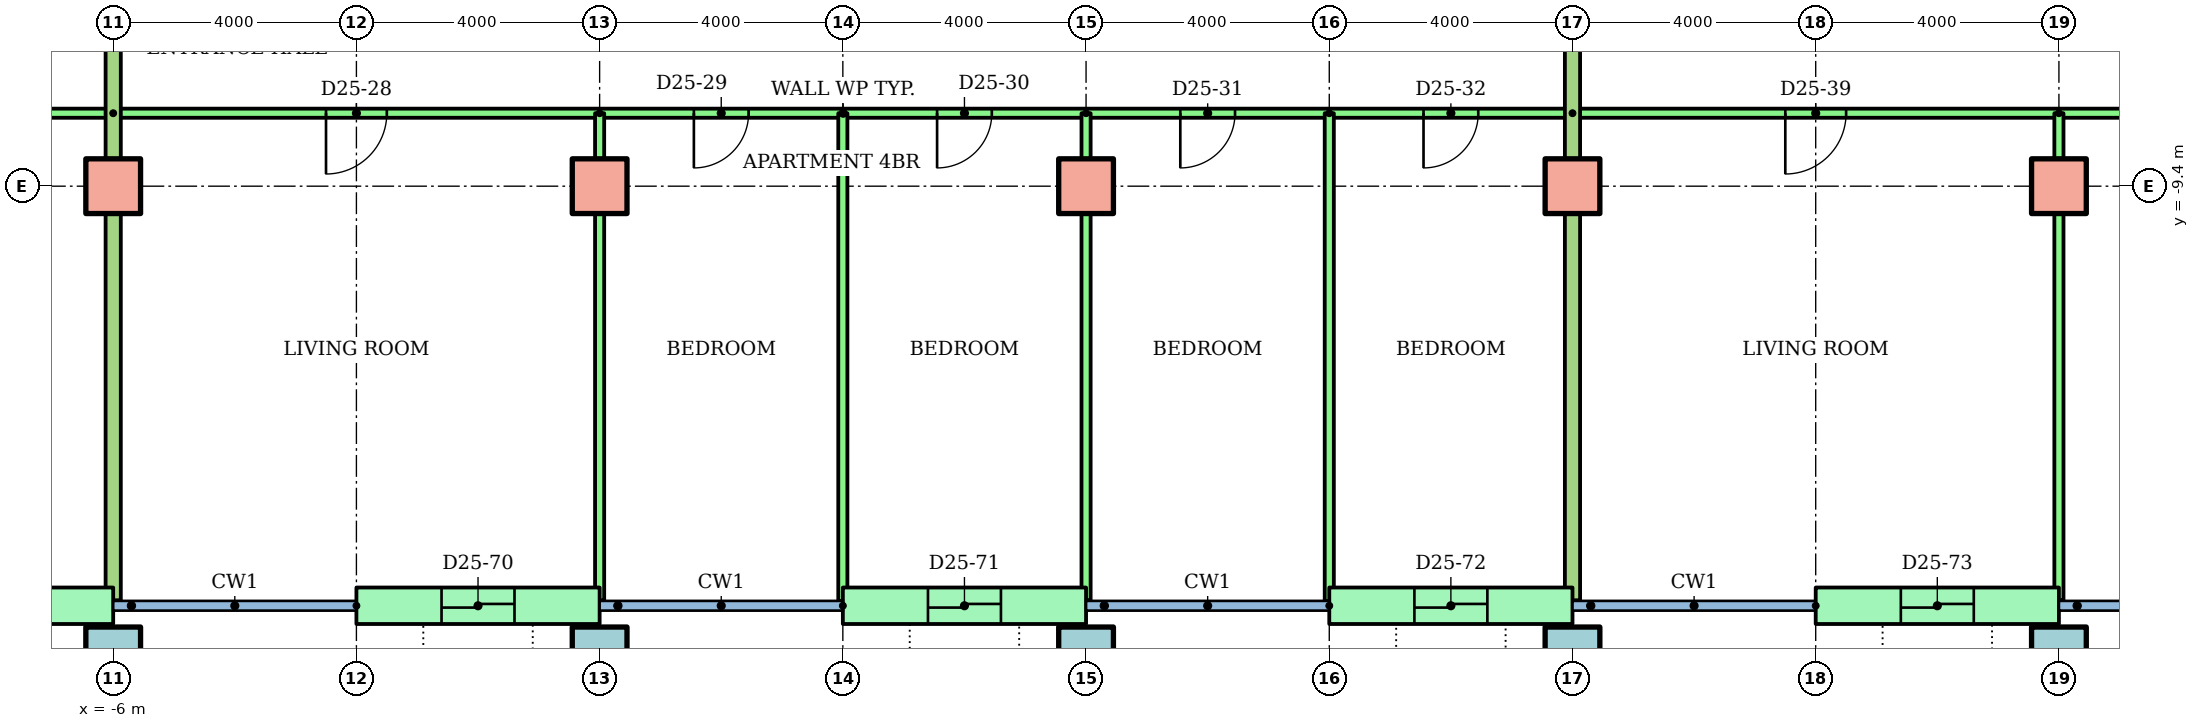
"""IFC4 building model, lengths in metres.
Left out: names, types, materials, properties, quantities, classifications, styles, units other than length and angle.
Written with IfcOpenShell. Run it as: python <this file> out.ifc"""

import sys

from ifc_helpers import new_model, si_unit, direction, frame, frame_2d, origin, origin_2d, place, context, subcontext, project, spatial, rectangle, hollow_rectangle, extrude, element, fill, save


model = new_model("IFC4")
c1 = context("Model", 3, precision=1e-05, world=origin(), true_north=direction((0.0, 1.0)))
c2 = subcontext(c1, "Body", "Model", "MODEL_VIEW")
j1 = project(units=[si_unit("LENGTHUNIT", "METRE"), si_unit("PLANEANGLEUNIT", "RADIAN")], contexts=[c1])
p1 = place(None, origin())
s1 = spatial("IfcSite", under=j1, at=p1, CompositionType="ELEMENT")
p2 = place(p1, origin())
s2 = spatial("IfcBuilding", under=s1, at=p2, CompositionType="ELEMENT")
p3 = place(p2, frame((0.0, 0.0, 96.7)))
s3 = spatial("IfcBuildingStorey", under=s2, at=p3, CompositionType="ELEMENT", Elevation=96.7)
for number, where in (
    (1, (-6.0, -17.1, 0.0)),
    (2, (2.0, -17.1, 0.0)),
    (3, (10.0, -17.1, 0.0)),
    (4, (18.0, -17.1, 0.0)),
    (5, (26.0, -17.1, 0.0)),
):
    element("IfcColumn", number, at=place(p3, frame(where)), inside=s3, PredefinedType="COLUMN", context=c2, shape_type="SweptSolid", body=[
        extrude(hollow_rectangle(XDim=0.9, YDim=0.9, WallThickness=0.045, at=origin_2d()), origin(), (0.0, 0.0, 1.0), 3.2),
    ])
for number, where in (
    (6, (-6.0, -9.4, 0.0)),
    (7, (2.0, -9.4, 0.0)),
    (8, (10.0, -9.4, 0.0)),
    (9, (18.0, -9.4, 0.0)),
    (10, (26.0, -9.4, 0.0)),
):
    element("IfcColumn", number, at=place(p3, frame(where)), inside=s3, PredefinedType="COLUMN", context=c2, shape_type="SweptSolid", body=[
        extrude(rectangle(XDim=0.9, YDim=0.9, at=origin_2d()), origin(), (0.0, 0.0, 1.0), 3.2),
    ])
p4 = place(p3, frame((-10.0, -16.3, 0.0)))
e11 = element("IfcWall", 11, at=p4, inside=s3, PredefinedType="STANDARD", context=c2, shape_type="SweptSolid", body=[
    extrude(rectangle(XDim=4.0, YDim=0.6, at=frame_2d((2.0, 0.0))), origin(), (0.0, 0.0, 1.0), 2.92),
])
p5 = place(p4, frame((1.4, 0.0, 0.0)))
e12 = element("IfcOpeningElement", 12, at=p5, cuts=e11, PredefinedType="OPENING", context=c2, shape_type="SweptSolid", body=[
    extrude(rectangle(XDim=1.2, YDim=2.1, at=frame_2d((0.6, 1.05))), frame((0.0, 0.31, 0.0), z_axis=(0.0, -1.0, 0.0), x_axis=(1.0, 0.0, 0.0)), (0.0, 0.0, 1.0), 0.62),
])
p6 = place(p3, frame((-2.0, -16.3, 0.0)))
e13 = element("IfcWall", 13, at=p6, inside=s3, PredefinedType="STANDARD", context=c2, shape_type="SweptSolid", body=[
    extrude(rectangle(XDim=4.0, YDim=0.6, at=frame_2d((2.0, 0.0))), origin(), (0.0, 0.0, 1.0), 2.92),
])
p7 = place(p6, frame((1.4, 0.0, 0.0)))
e14 = element("IfcOpeningElement", 14, at=p7, cuts=e13, PredefinedType="OPENING", context=c2, shape_type="SweptSolid", body=[
    extrude(rectangle(XDim=1.2, YDim=2.1, at=frame_2d((0.6, 1.05))), frame((0.0, 0.31, 0.0), z_axis=(0.0, -1.0, 0.0), x_axis=(1.0, 0.0, 0.0)), (0.0, 0.0, 1.0), 0.62),
])
p8 = place(p3, frame((6.0, -16.3, 0.0)))
e15 = element("IfcWall", 15, at=p8, inside=s3, PredefinedType="STANDARD", context=c2, shape_type="SweptSolid", body=[
    extrude(rectangle(XDim=4.0, YDim=0.6, at=frame_2d((2.0, 0.0))), origin(), (0.0, 0.0, 1.0), 2.92),
])
p9 = place(p8, frame((1.4, 0.0, 0.0)))
e16 = element("IfcOpeningElement", 16, at=p9, cuts=e15, PredefinedType="OPENING", context=c2, shape_type="SweptSolid", body=[
    extrude(rectangle(XDim=1.2, YDim=2.1, at=frame_2d((0.6, 1.05))), frame((0.0, 0.31, 0.0), z_axis=(0.0, -1.0, 0.0), x_axis=(1.0, 0.0, 0.0)), (0.0, 0.0, 1.0), 0.62),
])
p10 = place(p3, frame((14.0, -16.3, 0.0)))
e17 = element("IfcWall", 17, at=p10, inside=s3, PredefinedType="STANDARD", context=c2, shape_type="SweptSolid", body=[
    extrude(rectangle(XDim=4.0, YDim=0.6, at=frame_2d((2.0, 0.0))), origin(), (0.0, 0.0, 1.0), 2.92),
])
p11 = place(p10, frame((1.4, 0.0, 0.0)))
e18 = element("IfcOpeningElement", 18, at=p11, cuts=e17, PredefinedType="OPENING", context=c2, shape_type="SweptSolid", body=[
    extrude(rectangle(XDim=1.2, YDim=2.1, at=frame_2d((0.6, 1.05))), frame((0.0, 0.31, 0.0), z_axis=(0.0, -1.0, 0.0), x_axis=(1.0, 0.0, 0.0)), (0.0, 0.0, 1.0), 0.62),
])
p12 = place(p3, frame((22.0, -16.3, 0.0)))
e19 = element("IfcWall", 19, at=p12, inside=s3, PredefinedType="STANDARD", context=c2, shape_type="SweptSolid", body=[
    extrude(rectangle(XDim=4.0, YDim=0.6, at=frame_2d((2.0, 0.0))), origin(), (0.0, 0.0, 1.0), 2.92),
])
p13 = place(p12, frame((1.4, 0.0, 0.0)))
e20 = element("IfcOpeningElement", 20, at=p13, cuts=e19, PredefinedType="OPENING", context=c2, shape_type="SweptSolid", body=[
    extrude(rectangle(XDim=1.2, YDim=2.1, at=frame_2d((0.6, 1.05))), frame((0.0, 0.31, 0.0), z_axis=(0.0, -1.0, 0.0), x_axis=(1.0, 0.0, 0.0)), (0.0, 0.0, 1.0), 0.62),
])
p14 = place(p3, frame((-6.0, -8.2, 0.0), z_axis=(0.0, 0.0, 1.0), x_axis=(-1.0, 0.0, 0.0)))
e21 = element("IfcWall", 21, at=p14, inside=s3, PredefinedType="PARTITIONING", context=c2, shape_type="SweptSolid", body=[
    extrude(rectangle(XDim=22.61, YDim=0.15, at=frame_2d((11.305, 0.0))), origin(), (0.0, 0.0, 1.0), 2.4),
])
p15 = place(p14, frame((19.7, 0.0, 0.0)))
e22 = element("IfcOpeningElement", 22, at=p15, cuts=e21, PredefinedType="OPENING", context=c2, shape_type="SweptSolid", body=[
    extrude(rectangle(XDim=0.9, YDim=2.1, at=frame_2d((0.45, 1.05))), frame((0.0, 0.085, 0.0), z_axis=(0.0, -1.0, 0.0), x_axis=(1.0, 0.0, 0.0)), (0.0, 0.0, 1.0), 0.17),
])
p16 = place(p14, frame((14.411, 0.0, 0.0)))
e23 = element("IfcOpeningElement", 23, at=p16, cuts=e21, PredefinedType="OPENING", context=c2, shape_type="SweptSolid", body=[
    extrude(rectangle(XDim=0.9, YDim=2.1, at=frame_2d((0.45, 1.05))), frame((0.0, 0.085, 0.0), z_axis=(0.0, -1.0, 0.0), x_axis=(1.0, 0.0, 0.0)), (0.0, 0.0, 1.0), 0.17),
])
p17 = place(p14, frame((9.55, 0.0, 0.0)))
e24 = element("IfcOpeningElement", 24, at=p17, cuts=e21, PredefinedType="OPENING", context=c2, shape_type="SweptSolid", body=[
    extrude(rectangle(XDim=0.9, YDim=2.1, at=frame_2d((0.45, 1.05))), frame((0.0, 0.085, 0.0), z_axis=(0.0, -1.0, 0.0), x_axis=(1.0, 0.0, 0.0)), (0.0, 0.0, 1.0), 0.17),
])
p18 = place(p14, frame((3.5, 0.0, 0.0)))
e25 = element("IfcOpeningElement", 25, at=p18, cuts=e21, PredefinedType="OPENING", context=c2, shape_type="SweptSolid", body=[
    extrude(rectangle(XDim=1.0, YDim=2.1, at=frame_2d((0.5, 1.05))), frame((0.0, 0.085, 0.0), z_axis=(0.0, -1.0, 0.0), x_axis=(1.0, 0.0, 0.0)), (0.0, 0.0, 1.0), 0.17),
])
p19 = place(p3, frame((18.0, -8.2, 0.0), z_axis=(0.0, 0.0, 1.0), x_axis=(-1.0, 0.0, 0.0)))
e26 = element("IfcWall", 26, at=p19, inside=s3, PredefinedType="PARTITIONING", context=c2, shape_type="SweptSolid", body=[
    extrude(rectangle(XDim=24.0, YDim=0.15, at=frame_2d((12.0, 0.0))), origin(), (0.0, 0.0, 1.0), 2.4),
])
p20 = place(p19, frame((19.5, 0.0, 0.0)))
e27 = element("IfcOpeningElement", 27, at=p20, cuts=e26, PredefinedType="OPENING", context=c2, shape_type="SweptSolid", body=[
    extrude(rectangle(XDim=1.0, YDim=2.1, at=frame_2d((0.5, 1.05))), frame((0.0, 0.085, 0.0), z_axis=(0.0, -1.0, 0.0), x_axis=(1.0, 0.0, 0.0)), (0.0, 0.0, 1.0), 0.17),
])
p21 = place(p19, frame((13.55, 0.0, 0.0)))
e28 = element("IfcOpeningElement", 28, at=p21, cuts=e26, PredefinedType="OPENING", context=c2, shape_type="SweptSolid", body=[
    extrude(rectangle(XDim=0.9, YDim=2.1, at=frame_2d((0.45, 1.05))), frame((0.0, 0.085, 0.0), z_axis=(0.0, -1.0, 0.0), x_axis=(1.0, 0.0, 0.0)), (0.0, 0.0, 1.0), 0.17),
])
p22 = place(p19, frame((9.55, 0.0, 0.0)))
e29 = element("IfcOpeningElement", 29, at=p22, cuts=e26, PredefinedType="OPENING", context=c2, shape_type="SweptSolid", body=[
    extrude(rectangle(XDim=0.9, YDim=2.1, at=frame_2d((0.45, 1.05))), frame((0.0, 0.085, 0.0), z_axis=(0.0, -1.0, 0.0), x_axis=(1.0, 0.0, 0.0)), (0.0, 0.0, 1.0), 0.17),
])
p23 = place(p19, frame((5.55, 0.0, 0.0)))
e30 = element("IfcOpeningElement", 30, at=p23, cuts=e26, PredefinedType="OPENING", context=c2, shape_type="SweptSolid", body=[
    extrude(rectangle(XDim=0.9, YDim=2.1, at=frame_2d((0.45, 1.05))), frame((0.0, 0.085, 0.0), z_axis=(0.0, -1.0, 0.0), x_axis=(1.0, 0.0, 0.0)), (0.0, 0.0, 1.0), 0.17),
])
p24 = place(p19, frame((1.55, 0.0, 0.0)))
e31 = element("IfcOpeningElement", 31, at=p24, cuts=e26, PredefinedType="OPENING", context=c2, shape_type="SweptSolid", body=[
    extrude(rectangle(XDim=0.9, YDim=2.1, at=frame_2d((0.45, 1.05))), frame((0.0, 0.085, 0.0), z_axis=(0.0, -1.0, 0.0), x_axis=(1.0, 0.0, 0.0)), (0.0, 0.0, 1.0), 0.17),
])
p25 = place(p3, frame((2.0, -8.2, 0.0), z_axis=(0.0, 0.0, 1.0), x_axis=(0.0, -1.0, 0.0)))
e32 = element("IfcWall", 32, at=p25, inside=s3, PredefinedType="PARTITIONING", context=c2, shape_type="SweptSolid", body=[
    extrude(rectangle(XDim=8.01, YDim=0.15, at=frame_2d((4.005, 0.0))), origin(), (0.0, 0.0, 1.0), 2.4),
])
p26 = place(p3, frame((6.0, -8.2, 0.0), z_axis=(0.0, 0.0, 1.0), x_axis=(0.0, -1.0, 0.0)))
e33 = element("IfcWall", 33, at=p26, inside=s3, PredefinedType="PARTITIONING", context=c2, shape_type="SweptSolid", body=[
    extrude(rectangle(XDim=8.021, YDim=0.15, at=frame_2d((4.01, 0.0))), origin(), (0.0, 0.0, 1.0), 2.4),
])
p27 = place(p3, frame((10.0, -8.2, 0.0), z_axis=(0.0, 0.0, 1.0), x_axis=(0.0, -1.0, 0.0)))
e34 = element("IfcWall", 34, at=p27, inside=s3, PredefinedType="PARTITIONING", context=c2, shape_type="SweptSolid", body=[
    extrude(rectangle(XDim=8.01, YDim=0.15, at=frame_2d((4.005, 0.0))), origin(), (0.0, 0.0, 1.0), 2.4),
])
p28 = place(p3, frame((14.0, -8.2, 0.0), z_axis=(0.0, 0.0, 1.0), x_axis=(0.0, -1.0, 0.0)))
e35 = element("IfcWall", 35, at=p28, inside=s3, PredefinedType="PARTITIONING", context=c2, shape_type="SweptSolid", body=[
    extrude(rectangle(XDim=8.021, YDim=0.15, at=frame_2d((4.01, 0.0))), origin(), (0.0, 0.0, 1.0), 2.4),
])
p29 = place(p3, frame((-6.0, -1.4, 0.0), z_axis=(0.0, 0.0, 1.0), x_axis=(0.0, -1.0, 0.0)))
e36 = element("IfcWall", 36, at=p29, inside=s3, PredefinedType="PARTITIONING", context=c2, shape_type="SweptSolid", body=[
    extrude(rectangle(XDim=14.81, YDim=0.25, at=frame_2d((7.405, 0.0))), origin(), (0.0, 0.0, 1.0), 2.4),
])
p30 = place(p3, frame((40.62, -8.2, 0.0), z_axis=(0.0, 0.0, 1.0), x_axis=(-1.0, 0.0, 0.0)))
e37 = element("IfcWall", 37, at=p30, inside=s3, PredefinedType="PARTITIONING", context=c2, shape_type="SweptSolid", body=[
    extrude(rectangle(XDim=22.62, YDim=0.15, at=frame_2d((11.31, 0.0))), origin(), (0.0, 0.0, 1.0), 2.4),
])
p31 = place(p30, frame((18.12, 0.0, 0.0)))
e38 = element("IfcOpeningElement", 38, at=p31, cuts=e37, PredefinedType="OPENING", context=c2, shape_type="SweptSolid", body=[
    extrude(rectangle(XDim=1.0, YDim=2.1, at=frame_2d((0.5, 1.05))), frame((0.0, 0.085, 0.0), z_axis=(0.0, -1.0, 0.0), x_axis=(1.0, 0.0, 0.0)), (0.0, 0.0, 1.0), 0.17),
])
p32 = place(p30, frame((12.17, 0.0, 0.0)))
e39 = element("IfcOpeningElement", 39, at=p32, cuts=e37, PredefinedType="OPENING", context=c2, shape_type="SweptSolid", body=[
    extrude(rectangle(XDim=0.9, YDim=2.1, at=frame_2d((0.45, 1.05))), frame((0.0, 0.085, 0.0), z_axis=(0.0, -1.0, 0.0), x_axis=(1.0, 0.0, 0.0)), (0.0, 0.0, 1.0), 0.17),
])
p33 = place(p30, frame((8.17, 0.0, 0.0)))
e40 = element("IfcOpeningElement", 40, at=p33, cuts=e37, PredefinedType="OPENING", context=c2, shape_type="SweptSolid", body=[
    extrude(rectangle(XDim=0.9, YDim=2.1, at=frame_2d((0.45, 1.05))), frame((0.0, 0.085, 0.0), z_axis=(0.0, -1.0, 0.0), x_axis=(1.0, 0.0, 0.0)), (0.0, 0.0, 1.0), 0.17),
])
p34 = place(p30, frame((2.97, 0.0, 0.0)))
e41 = element("IfcOpeningElement", 41, at=p34, cuts=e37, PredefinedType="OPENING", context=c2, shape_type="SweptSolid", body=[
    extrude(rectangle(XDim=0.9, YDim=2.1, at=frame_2d((0.45, 1.05))), frame((0.0, 0.085, 0.0), z_axis=(0.0, -1.0, 0.0), x_axis=(1.0, 0.0, 0.0)), (0.0, 0.0, 1.0), 0.17),
])
p35 = place(p3, frame((26.0, -8.2, 0.0), z_axis=(0.0, 0.0, 1.0), x_axis=(0.0, -1.0, 0.0)))
e42 = element("IfcWall", 42, at=p35, inside=s3, PredefinedType="PARTITIONING", context=c2, shape_type="SweptSolid", body=[
    extrude(rectangle(XDim=8.01, YDim=0.15, at=frame_2d((4.005, 0.0))), origin(), (0.0, 0.0, 1.0), 2.4),
])
p36 = place(p3, frame((18.0, -1.4, 0.0), z_axis=(0.0, 0.0, 1.0), x_axis=(0.0, -1.0, 0.0)))
e43 = element("IfcWall", 43, at=p36, inside=s3, PredefinedType="PARTITIONING", context=c2, shape_type="SweptSolid", body=[
    extrude(rectangle(XDim=14.81, YDim=0.25, at=frame_2d((7.405, 0.0))), origin(), (0.0, 0.0, 1.0), 2.4),
])
p37 = place(p20, origin())
e44 = element("IfcDoor", 44, at=p37, inside=s3, OperationType="SINGLE_SWING_RIGHT", PredefinedType="DOOR", context=c2, shape_type="SweptSolid", body=[
    extrude(rectangle(XDim=1.0, YDim=2.1, at=frame_2d((0.5, 1.05))), frame((0.0, 0.025, 0.0), z_axis=(0.0, -1.0, 0.0), x_axis=(1.0, 0.0, 0.0)), (0.0, 0.0, 1.0), 0.05),
])
fill(e27, e44)
p38 = place(p21, origin())
e45 = element("IfcDoor", 45, at=p38, inside=s3, OperationType="SINGLE_SWING_RIGHT", PredefinedType="DOOR", context=c2, shape_type="SweptSolid", body=[
    extrude(rectangle(XDim=0.9, YDim=2.1, at=frame_2d((0.45, 1.05))), frame((0.0, 0.025, 0.0), z_axis=(0.0, -1.0, 0.0), x_axis=(1.0, 0.0, 0.0)), (0.0, 0.0, 1.0), 0.05),
])
fill(e28, e45)
p39 = place(p22, origin())
e46 = element("IfcDoor", 46, at=p39, inside=s3, OperationType="SINGLE_SWING_RIGHT", PredefinedType="DOOR", context=c2, shape_type="SweptSolid", body=[
    extrude(rectangle(XDim=0.9, YDim=2.1, at=frame_2d((0.45, 1.05))), frame((0.0, 0.025, 0.0), z_axis=(0.0, -1.0, 0.0), x_axis=(1.0, 0.0, 0.0)), (0.0, 0.0, 1.0), 0.05),
])
fill(e29, e46)
p40 = place(p23, origin())
e47 = element("IfcDoor", 47, at=p40, inside=s3, OperationType="SINGLE_SWING_RIGHT", PredefinedType="DOOR", context=c2, shape_type="SweptSolid", body=[
    extrude(rectangle(XDim=0.9, YDim=2.1, at=frame_2d((0.45, 1.05))), frame((0.0, 0.025, 0.0), z_axis=(0.0, -1.0, 0.0), x_axis=(1.0, 0.0, 0.0)), (0.0, 0.0, 1.0), 0.05),
])
fill(e30, e47)
p41 = place(p24, origin())
e48 = element("IfcDoor", 48, at=p41, inside=s3, OperationType="SINGLE_SWING_RIGHT", PredefinedType="DOOR", context=c2, shape_type="SweptSolid", body=[
    extrude(rectangle(XDim=0.9, YDim=2.1, at=frame_2d((0.45, 1.05))), frame((0.0, 0.025, 0.0), z_axis=(0.0, -1.0, 0.0), x_axis=(1.0, 0.0, 0.0)), (0.0, 0.0, 1.0), 0.05),
])
fill(e31, e48)
p42 = place(p31, origin())
e49 = element("IfcDoor", 49, at=p42, inside=s3, OperationType="SINGLE_SWING_RIGHT", PredefinedType="DOOR", context=c2, shape_type="SweptSolid", body=[
    extrude(rectangle(XDim=1.0, YDim=2.1, at=frame_2d((0.5, 1.05))), frame((0.0, 0.025, 0.0), z_axis=(0.0, -1.0, 0.0), x_axis=(1.0, 0.0, 0.0)), (0.0, 0.0, 1.0), 0.05),
])
fill(e38, e49)
p43 = place(p7, origin())
e50 = element("IfcDoor", 50, at=p43, inside=s3, OperationType="SLIDING_TO_LEFT", PredefinedType="DOOR", context=c2, shape_type="SweptSolid", body=[
    extrude(rectangle(XDim=1.2, YDim=2.1, at=frame_2d((0.6, 1.05))), frame((0.0, 0.025, 0.0), z_axis=(0.0, -1.0, 0.0), x_axis=(1.0, 0.0, 0.0)), (0.0, 0.0, 1.0), 0.05),
])
fill(e14, e50)
p44 = place(p9, origin())
e51 = element("IfcDoor", 51, at=p44, inside=s3, OperationType="SLIDING_TO_LEFT", PredefinedType="DOOR", context=c2, shape_type="SweptSolid", body=[
    extrude(rectangle(XDim=1.2, YDim=2.1, at=frame_2d((0.6, 1.05))), frame((0.0, 0.025, 0.0), z_axis=(0.0, -1.0, 0.0), x_axis=(1.0, 0.0, 0.0)), (0.0, 0.0, 1.0), 0.05),
])
fill(e16, e51)
p45 = place(p11, origin())
e52 = element("IfcDoor", 52, at=p45, inside=s3, OperationType="SLIDING_TO_LEFT", PredefinedType="DOOR", context=c2, shape_type="SweptSolid", body=[
    extrude(rectangle(XDim=1.2, YDim=2.1, at=frame_2d((0.6, 1.05))), frame((0.0, 0.025, 0.0), z_axis=(0.0, -1.0, 0.0), x_axis=(1.0, 0.0, 0.0)), (0.0, 0.0, 1.0), 0.05),
])
fill(e18, e52)
p46 = place(p13, origin())
e53 = element("IfcDoor", 53, at=p46, inside=s3, OperationType="SLIDING_TO_LEFT", PredefinedType="DOOR", context=c2, shape_type="SweptSolid", body=[
    extrude(rectangle(XDim=1.2, YDim=2.1, at=frame_2d((0.6, 1.05))), frame((0.0, 0.025, 0.0), z_axis=(0.0, -1.0, 0.0), x_axis=(1.0, 0.0, 0.0)), (0.0, 0.0, 1.0), 0.05),
])
fill(e20, e53)
save(model, sys.argv[1])
